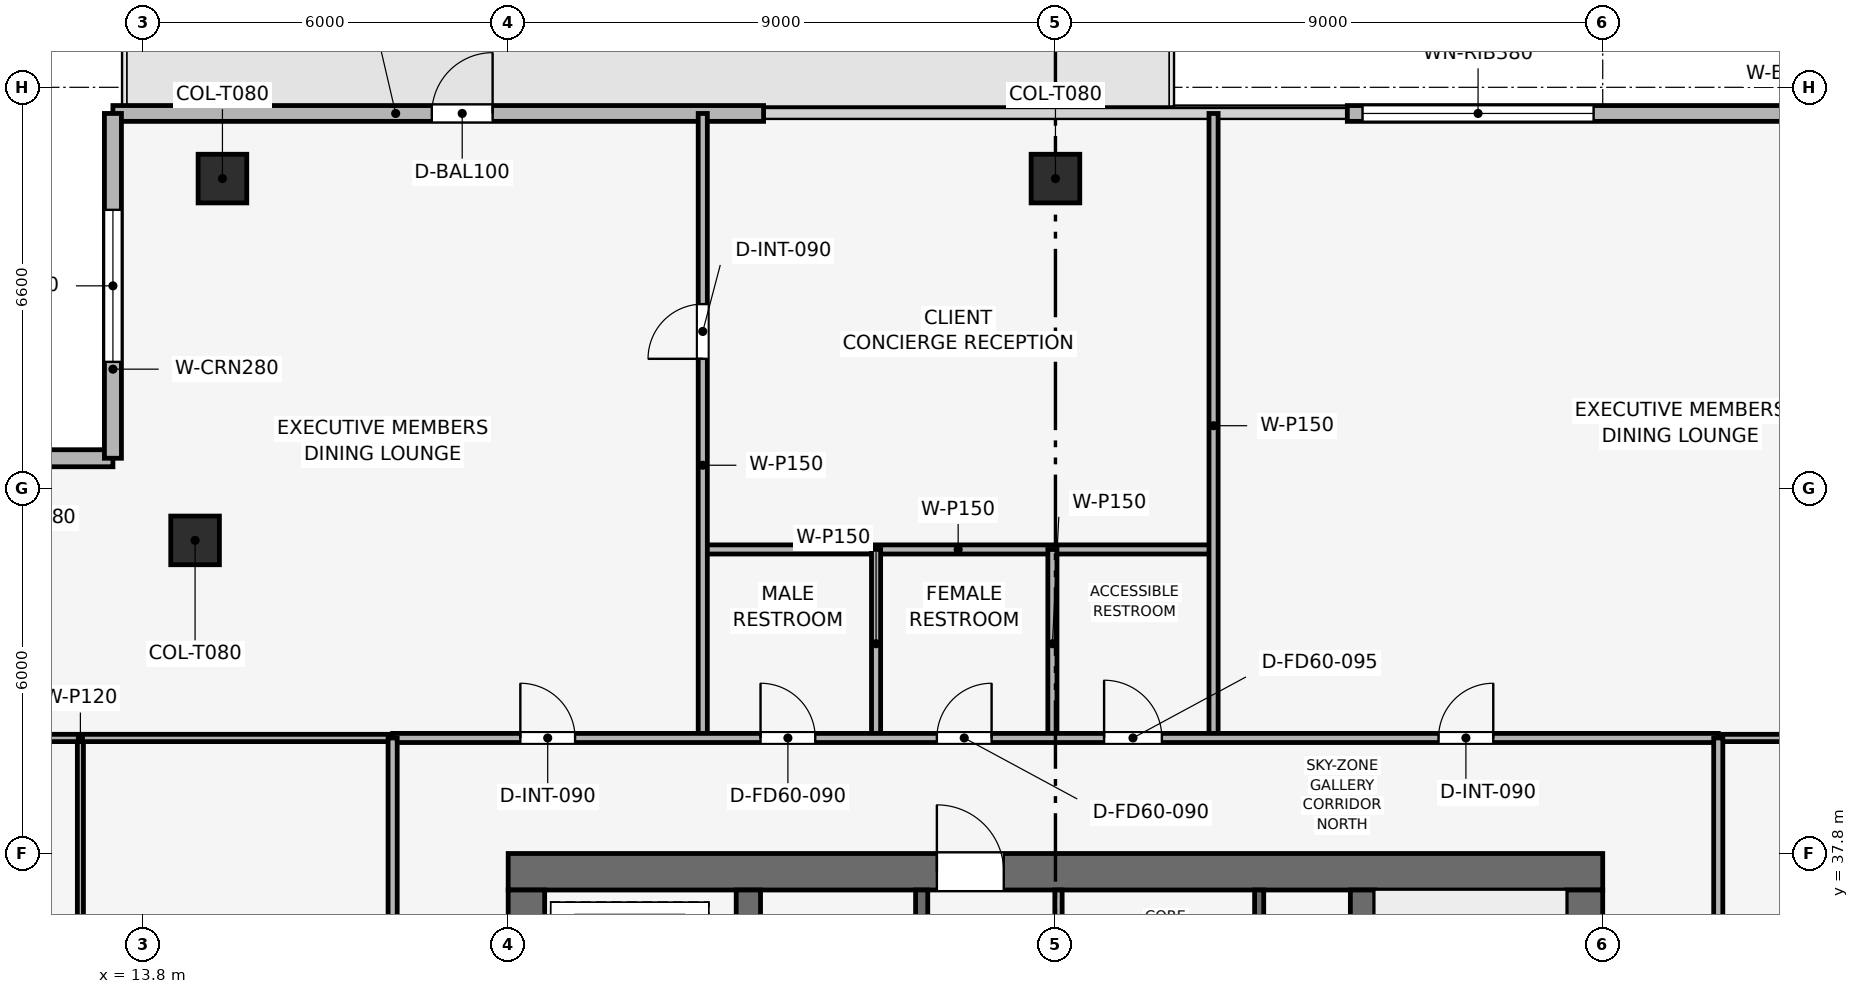
"""IFC4 building model, lengths in metres.
Left out: names, types, materials, properties, quantities, classifications, styles, units other than length and angle.
Written with IfcOpenShell. Run it as: python <this file> out.ifc"""

import sys

from ifc_helpers import new_model, si_unit, direction, frame, frame_2d, origin, origin_2d, place, context, subcontext, project, spatial, rectangle, extrude, element, fill, save


model = new_model("IFC4")
c1 = context("Model", 3, precision=1e-05, world=origin(), true_north=direction((0.0, 1.0)))
c2 = subcontext(c1, "Body", "Model", "MODEL_VIEW")
j1 = project(units=[si_unit("LENGTHUNIT", "METRE"), si_unit("PLANEANGLEUNIT", "RADIAN")], contexts=[c1])
p1 = place(None, origin())
s1 = spatial("IfcSite", under=j1, at=p1, CompositionType="ELEMENT")
p2 = place(p1, origin())
s2 = spatial("IfcBuilding", under=s1, at=p2, CompositionType="ELEMENT")
p3 = place(p2, frame((0.0, 0.0, 351.75)))
s3 = spatial("IfcBuildingStorey", under=s2, at=p3, CompositionType="ELEMENT", Elevation=351.75)
p4 = place(p3, frame((19.8, 37.5, 0.0), z_axis=(0.0, 0.0, 1.0), x_axis=(1.0, 0.0, 0.0)))
e1 = element("IfcWall", 1, at=p4, inside=s3, PredefinedType="SHEAR", context=c2, shape_type="SweptSolid", body=[
    extrude(rectangle(XDim=18.0, YDim=0.6, at=frame_2d((9.0, 0.0))), origin(), (0.0, 0.0, 1.0), 3.75),
])
p5 = place(p4, frame((7.05, 0.0, 0.0)))
e2 = element("IfcOpeningElement", 2, at=p5, cuts=e1, PredefinedType="OPENING", context=c2, shape_type="SweptSolid", body=[
    extrude(rectangle(XDim=1.1, YDim=2.15, at=frame_2d((0.55, 1.075))), frame((0.0, 0.31, 0.0), z_axis=(0.0, -1.0, 0.0), x_axis=(1.0, 0.0, 0.0)), (0.0, 0.0, 1.0), 0.62),
])
p6 = place(p3, frame((20.1, 20.4, 0.0), z_axis=(0.0, 0.0, 1.0), x_axis=(0.0, 1.0, 0.0)))
e3 = element("IfcWall", 3, at=p6, inside=s3, PredefinedType="SHEAR", context=c2, shape_type="SweptSolid", body=[
    extrude(rectangle(XDim=16.8, YDim=0.6, at=frame_2d((8.4, 0.0))), origin(), (0.0, 0.0, 1.0), 3.75),
])
p7 = place(p6, frame((10.4, 0.0, 0.0)))
e4 = element("IfcOpeningElement", 4, at=p7, cuts=e3, PredefinedType="OPENING", context=c2, shape_type="SweptSolid", body=[
    extrude(rectangle(XDim=1.1, YDim=2.15, at=frame_2d((0.55, 1.075))), frame((0.0, 0.31, 0.0), z_axis=(0.0, -1.0, 0.0), x_axis=(1.0, 0.0, 0.0)), (0.0, 0.0, 1.0), 0.62),
])
p8 = place(p3, frame((37.5, 20.4, 0.0), z_axis=(0.0, 0.0, 1.0), x_axis=(0.0, 1.0, 0.0)))
e5 = element("IfcWall", 5, at=p8, inside=s3, PredefinedType="SHEAR", context=c2, shape_type="SweptSolid", body=[
    extrude(rectangle(XDim=16.8, YDim=0.6, at=frame_2d((8.4, 0.0))), origin(), (0.0, 0.0, 1.0), 3.75),
])
p9 = place(p8, frame((4.9, 0.0, 0.0)))
e6 = element("IfcOpeningElement", 6, at=p9, cuts=e5, PredefinedType="OPENING", context=c2, shape_type="SweptSolid", body=[
    extrude(rectangle(XDim=1.1, YDim=2.15, at=frame_2d((0.55, 1.075))), frame((0.0, 0.31, 0.0), z_axis=(0.0, -1.0, 0.0), x_axis=(1.0, 0.0, 0.0)), (0.0, 0.0, 1.0), 0.62),
])
for number, where, z_axis, x_axis in (
    (7, (23.75, 20.4, 0.0), (0.0, 0.0, 1.0), (0.0, 1.0, 0.0)),
    (8, (33.85, 20.4, 0.0), (0.0, 0.0, 1.0), (0.0, 1.0, 0.0)),
):
    element("IfcWall", number, at=place(p3, frame(where, z_axis=z_axis, x_axis=x_axis)), inside=s3, PredefinedType="SHEAR", context=c2, shape_type="SweptSolid", body=[
        extrude(rectangle(XDim=16.8, YDim=0.4, at=frame_2d((8.4, 0.0))), origin(), (0.0, 0.0, 1.0), 3.75),
    ])
p10 = place(p3, frame((28.8, 48.899, 0.003), z_axis=(0.0, -0.233305947424, 0.972403380751), x_axis=(1.0, 0.0, 0.0)))
e9 = element("IfcColumn", 9, at=p10, inside=s3, PredefinedType="COLUMN", context=c2, shape_type="SweptSolid", body=[
    extrude(rectangle(XDim=0.8, YDim=0.8, at=origin_2d()), origin(), (0.0, 0.0, 1.0), 3.583),
])
p11 = place(p3, frame((15.101, 48.899, 0.003), z_axis=(0.178472331722, -0.229560204289, 0.956791377164), x_axis=(0.789476355048, 0.613780974632, 0.0)))
e10 = element("IfcColumn", 10, at=p11, inside=s3, PredefinedType="COLUMN", context=c2, shape_type="SweptSolid", body=[
    extrude(rectangle(XDim=0.8, YDim=0.8, at=origin_2d()), origin(), (0.0, 0.0, 1.0), 3.641),
])
p12 = place(p3, frame((14.651, 42.949, 0.003), z_axis=(0.180427651354, -0.180359897824, 0.966910631798), x_axis=(0.706973978714, 0.707239558722, 0.0)))
e11 = element("IfcColumn", 11, at=p12, inside=s3, PredefinedType="COLUMN", context=c2, shape_type="SweptSolid", body=[
    extrude(rectangle(XDim=0.8, YDim=0.8, at=origin_2d()), origin(), (0.0, 0.0, 1.0), 3.603),
])
p13 = place(p3, frame((13.3, 49.97, 0.0), z_axis=(0.0, 0.0, 1.0), x_axis=(1.0, 0.0, 0.0)))
e12 = element("IfcWall", 12, at=p13, inside=s3, PredefinedType="SOLIDWALL", context=c2, shape_type="SweptSolid", body=[
    extrude(rectangle(XDim=10.7, YDim=0.26, at=frame_2d((5.35, 0.0))), origin(), (0.0, 0.0, 1.0), 3.49),
])
p14 = place(p13, frame((5.244, 0.0, 0.0)))
e13 = element("IfcOpeningElement", 13, at=p14, cuts=e12, PredefinedType="OPENING", context=c2, shape_type="SweptSolid", body=[
    extrude(rectangle(XDim=1.0, YDim=2.2, at=frame_2d((0.5, 1.1))), frame((0.0, 0.14, 0.0), z_axis=(0.0, -1.0, 0.0), x_axis=(1.0, 0.0, 0.0)), (0.0, 0.0, 1.0), 0.28),
])
p15 = place(p3, frame((33.6, 49.97, 0.0), z_axis=(0.0, 0.0, 1.0), x_axis=(1.0, 0.0, 0.0)))
e14 = element("IfcWall", 14, at=p15, inside=s3, PredefinedType="SOLIDWALL", context=c2, shape_type="SweptSolid", body=[
    extrude(rectangle(XDim=10.7, YDim=0.26, at=frame_2d((5.35, 0.0))), origin(), (0.0, 0.0, 1.0), 3.49),
])
p16 = place(p15, frame((0.25, 0.0, 0.9)))
e15 = element("IfcOpeningElement", 15, at=p16, cuts=e14, PredefinedType="OPENING", context=c2, shape_type="SweptSolid", body=[
    extrude(rectangle(XDim=3.8, YDim=1.9, at=frame_2d((1.9, 0.95))), frame((0.0, 0.14, 0.0), z_axis=(0.0, -1.0, 0.0), x_axis=(1.0, 0.0, 0.0)), (0.0, 0.0, 1.0), 0.28),
])
p17 = place(p3, frame((7.63, 44.3, 0.0), z_axis=(0.0, 0.0, 1.0), x_axis=(1.0, 0.0, 0.0)))
e16 = element("IfcWall", 16, at=p17, inside=s3, PredefinedType="SOLIDWALL", context=c2, shape_type="SweptSolid", body=[
    extrude(rectangle(XDim=5.67, YDim=0.28, at=frame_2d((2.835, 0.0))), origin(), (0.0, 0.0, 1.0), 3.49),
])
p18 = place(p17, frame((1.585, 0.0, 0.9)))
e17 = element("IfcOpeningElement", 17, at=p18, cuts=e16, PredefinedType="OPENING", context=c2, shape_type="SweptSolid", body=[
    extrude(rectangle(XDim=2.5, YDim=1.9, at=frame_2d((1.25, 0.95))), frame((0.0, 0.15, 0.0), z_axis=(0.0, -1.0, 0.0), x_axis=(1.0, 0.0, 0.0)), (0.0, 0.0, 1.0), 0.3),
])
p19 = place(p3, frame((13.3, 44.3, 0.0), z_axis=(0.0, 0.0, 1.0), x_axis=(0.0, 1.0, 0.0)))
e18 = element("IfcWall", 18, at=p19, inside=s3, PredefinedType="SOLIDWALL", context=c2, shape_type="SweptSolid", body=[
    extrude(rectangle(XDim=5.67, YDim=0.28, at=frame_2d((2.835, 0.0))), origin(), (0.0, 0.0, 1.0), 3.49),
])
p20 = place(p19, frame((1.585, 0.0, 0.9)))
e19 = element("IfcOpeningElement", 19, at=p20, cuts=e18, PredefinedType="OPENING", context=c2, shape_type="SweptSolid", body=[
    extrude(rectangle(XDim=2.5, YDim=1.9, at=frame_2d((1.25, 0.95))), frame((0.0, 0.15, 0.0), z_axis=(0.0, -1.0, 0.0), x_axis=(1.0, 0.0, 0.0)), (0.0, 0.0, 1.0), 0.3),
])
p21 = place(p3, frame((32.15, 34.0, 0.0), z_axis=(0.0, 0.0, 1.0), x_axis=(0.0, 1.0, 0.0)))
e20 = element("IfcWall", 20, at=p21, inside=s3, PredefinedType="SHEAR", context=c2, shape_type="SweptSolid", body=[
    extrude(rectangle(XDim=3.2, YDim=0.15, at=frame_2d((1.6, 0.0))), origin(), (0.0, 0.0, 1.0), 3.49),
])
p22 = place(p3, frame((26.6, 34.0, 0.0), z_axis=(0.0, 0.0, 1.0), x_axis=(0.0, 1.0, 0.0)))
e21 = element("IfcWall", 21, at=p22, inside=s3, PredefinedType="SHEAR", context=c2, shape_type="SweptSolid", body=[
    extrude(rectangle(XDim=3.2, YDim=0.2, at=frame_2d((1.6, 0.0))), origin(), (0.0, 0.0, 1.0), 3.49),
])
p23 = place(p22, frame((0.75, 0.0, 0.0)))
e22 = element("IfcOpeningElement", 22, at=p23, cuts=e21, PredefinedType="OPENING", context=c2, shape_type="SweptSolid", body=[
    extrude(rectangle(XDim=1.1, YDim=2.15, at=frame_2d((0.55, 1.075))), frame((0.0, 0.11, 0.0), z_axis=(0.0, -1.0, 0.0), x_axis=(1.0, 0.0, 0.0)), (0.0, 0.0, 1.0), 0.22),
])
p24 = place(p3, frame((28.85, 33.925, 0.0), z_axis=(0.0, 0.0, 1.0), x_axis=(0.0, 1.0, 0.0)))
e23 = element("IfcWall", 23, at=p24, inside=s3, PredefinedType="PARTITIONING", context=c2, shape_type="SweptSolid", body=[
    extrude(rectangle(XDim=3.275, YDim=0.12, at=frame_2d((1.637, 0.0))), origin(), (0.0, 0.0, 1.0), 3.49),
])
p25 = place(p24, frame((0.25, 0.0, 0.0)))
e24 = element("IfcOpeningElement", 24, at=p25, cuts=e23, PredefinedType="OPENING", context=c2, shape_type="SweptSolid", body=[
    extrude(rectangle(XDim=0.85, YDim=2.1, at=frame_2d((0.425, 1.05))), frame((0.0, 0.07, 0.0), z_axis=(0.0, -1.0, 0.0), x_axis=(1.0, 0.0, 0.0)), (0.0, 0.0, 1.0), 0.14),
])
p26 = place(p24, frame((1.795, 0.0, 0.0)))
e25 = element("IfcOpeningElement", 25, at=p26, cuts=e23, PredefinedType="OPENING", context=c2, shape_type="SweptSolid", body=[
    extrude(rectangle(XDim=0.85, YDim=2.1, at=frame_2d((0.425, 1.05))), frame((0.0, 0.07, 0.0), z_axis=(0.0, -1.0, 0.0), x_axis=(1.0, 0.0, 0.0)), (0.0, 0.0, 1.0), 0.14),
])
p27 = place(p3, frame((23.0, 42.8, 0.0), z_axis=(0.0, 0.0, 1.0), x_axis=(1.0, 0.0, 0.0)))
e26 = element("IfcWall", 26, at=p27, inside=s3, PredefinedType="PARTITIONING", context=c2, shape_type="SweptSolid", body=[
    extrude(rectangle(XDim=8.4, YDim=0.15, at=frame_2d((4.2, 0.0))), origin(), (0.0, 0.0, 1.0), 3.075),
])
p28 = place(p3, frame((23.0, 39.7, 0.0), z_axis=(0.0, 0.0, 1.0), x_axis=(0.0, 1.0, 0.0)))
e27 = element("IfcWall", 27, at=p28, inside=s3, PredefinedType="PARTITIONING", context=c2, shape_type="SweptSolid", body=[
    extrude(rectangle(XDim=10.27, YDim=0.15, at=frame_2d((5.135, 0.0))), origin(), (0.0, 0.0, 1.0), 3.115),
])
p29 = place(p28, frame((6.235, 0.0, 0.0)))
e28 = element("IfcOpeningElement", 28, at=p29, cuts=e27, PredefinedType="OPENING", context=c2, shape_type="SweptSolid", body=[
    extrude(rectangle(XDim=0.9, YDim=2.1, at=frame_2d((0.45, 1.05))), frame((0.0, 0.085, 0.0), z_axis=(0.0, -1.0, 0.0), x_axis=(1.0, 0.0, 0.0)), (0.0, 0.0, 1.0), 0.17),
])
p30 = place(p3, frame((31.4, 39.7, 0.0), z_axis=(0.0, 0.0, 1.0), x_axis=(0.0, 1.0, 0.0)))
e29 = element("IfcWall", 29, at=p30, inside=s3, PredefinedType="PARTITIONING", context=c2, shape_type="SweptSolid", body=[
    extrude(rectangle(XDim=10.27, YDim=0.15, at=frame_2d((5.135, 0.0))), origin(), (0.0, 0.0, 1.0), 3.115),
])
p31 = place(p3, frame((25.85, 39.7, 0.0), z_axis=(0.0, 0.0, 1.0), x_axis=(0.0, 1.0, 0.0)))
e30 = element("IfcWall", 30, at=p31, inside=s3, PredefinedType="PARTITIONING", context=c2, shape_type="SweptSolid", body=[
    extrude(rectangle(XDim=3.1, YDim=0.15, at=frame_2d((1.55, 0.0))), origin(), (0.0, 0.0, 1.0), 3.115),
])
p32 = place(p3, frame((28.75, 39.7, 0.0), z_axis=(0.0, 0.0, 1.0), x_axis=(0.0, 1.0, 0.0)))
e31 = element("IfcWall", 31, at=p32, inside=s3, PredefinedType="PARTITIONING", context=c2, shape_type="SweptSolid", body=[
    extrude(rectangle(XDim=3.1, YDim=0.15, at=frame_2d((1.55, 0.0))), origin(), (0.0, 0.0, 1.0), 3.075),
])
p33 = place(p3, frame((12.765, 22.358, 0.0), z_axis=(0.0, 0.0, 1.0), x_axis=(0.0, 1.0, 0.0)))
e32 = element("IfcWall", 32, at=p33, inside=s3, PredefinedType="MOVABLE", context=c2, shape_type="SweptSolid", body=[
    extrude(rectangle(XDim=17.342, YDim=0.1, at=frame_2d((8.671, 0.0))), origin(), (0.0, 0.0, 1.0), 3.075),
])
p34 = place(p33, frame((12.9, 0.0, 0.0)))
e33 = element("IfcOpeningElement", 33, at=p34, cuts=e32, PredefinedType="OPENING", context=c2, shape_type="SweptSolid", body=[
    extrude(rectangle(XDim=0.9, YDim=2.1, at=frame_2d((0.45, 1.05))), frame((0.0, 0.06, 0.0), z_axis=(0.0, -1.0, 0.0), x_axis=(1.0, 0.0, 0.0)), (0.0, 0.0, 1.0), 0.12),
])
for number, where, z_axis, x_axis in (
    (34, (7.63, 39.7, 0.0), (0.0, 0.0, 1.0), (1.0, 0.0, 0.0)),
    (35, (39.7, 39.7, 0.0), (0.0, 0.0, 1.0), (1.0, 0.0, 0.0)),
):
    element("IfcWall", number, at=place(p3, frame(where, z_axis=z_axis, x_axis=x_axis)), inside=s3, PredefinedType="PARTITIONING", context=c2, shape_type="SweptSolid", body=[
        extrude(rectangle(XDim=10.27, YDim=0.12, at=frame_2d((5.135, 0.0))), origin(), (0.0, 0.0, 1.0), 3.075),
    ])
p35 = place(p3, frame((17.9, 39.7, 0.0), z_axis=(0.0, 0.0, 1.0), x_axis=(1.0, 0.0, 0.0)))
e36 = element("IfcWall", 36, at=p35, inside=s3, PredefinedType="PARTITIONING", context=c2, shape_type="SweptSolid", body=[
    extrude(rectangle(XDim=21.8, YDim=0.15, at=frame_2d((10.9, 0.0))), origin(), (0.0, 0.0, 1.0), 3.075),
])
p36 = place(p35, frame((2.1, 0.0, 0.0)))
e37 = element("IfcOpeningElement", 37, at=p36, cuts=e36, PredefinedType="OPENING", context=c2, shape_type="SweptSolid", body=[
    extrude(rectangle(XDim=0.9, YDim=2.1, at=frame_2d((0.45, 1.05))), frame((0.0, 0.085, 0.0), z_axis=(0.0, -1.0, 0.0), x_axis=(1.0, 0.0, 0.0)), (0.0, 0.0, 1.0), 0.17),
])
p37 = place(p35, frame((6.05, 0.0, 0.0)))
e38 = element("IfcOpeningElement", 38, at=p37, cuts=e36, PredefinedType="OPENING", context=c2, shape_type="SweptSolid", body=[
    extrude(rectangle(XDim=0.9, YDim=2.1, at=frame_2d((0.45, 1.05))), frame((0.0, 0.085, 0.0), z_axis=(0.0, -1.0, 0.0), x_axis=(1.0, 0.0, 0.0)), (0.0, 0.0, 1.0), 0.17),
])
p38 = place(p35, frame((8.95, 0.0, 0.0)))
e39 = element("IfcOpeningElement", 39, at=p38, cuts=e36, PredefinedType="OPENING", context=c2, shape_type="SweptSolid", body=[
    extrude(rectangle(XDim=0.9, YDim=2.1, at=frame_2d((0.45, 1.05))), frame((0.0, 0.085, 0.0), z_axis=(0.0, -1.0, 0.0), x_axis=(1.0, 0.0, 0.0)), (0.0, 0.0, 1.0), 0.17),
])
p39 = place(p35, frame((11.7, 0.0, 0.0)))
e40 = element("IfcOpeningElement", 40, at=p39, cuts=e36, PredefinedType="OPENING", context=c2, shape_type="SweptSolid", body=[
    extrude(rectangle(XDim=0.95, YDim=2.1, at=frame_2d((0.475, 1.05))), frame((0.0, 0.085, 0.0), z_axis=(0.0, -1.0, 0.0), x_axis=(1.0, 0.0, 0.0)), (0.0, 0.0, 1.0), 0.17),
])
p40 = place(p35, frame((17.2, 0.0, 0.0)))
e41 = element("IfcOpeningElement", 41, at=p40, cuts=e36, PredefinedType="OPENING", context=c2, shape_type="SweptSolid", body=[
    extrude(rectangle(XDim=0.9, YDim=2.1, at=frame_2d((0.45, 1.05))), frame((0.0, 0.085, 0.0), z_axis=(0.0, -1.0, 0.0), x_axis=(1.0, 0.0, 0.0)), (0.0, 0.0, 1.0), 0.17),
])
p41 = place(p3, frame((17.9, 13.3, 0.0), z_axis=(0.0, 0.0, 1.0), x_axis=(0.0, 1.0, 0.0)))
e42 = element("IfcWall", 42, at=p41, inside=s3, PredefinedType="PARTITIONING", context=c2, shape_type="SweptSolid", body=[
    extrude(rectangle(XDim=26.4, YDim=0.15, at=frame_2d((13.2, 0.0))), origin(), (0.0, 0.0, 1.0), 3.075),
])
p42 = place(p41, frame((4.079, 0.0, 0.0)))
e43 = element("IfcOpeningElement", 43, at=p42, cuts=e42, PredefinedType="OPENING", context=c2, shape_type="SweptSolid", body=[
    extrude(rectangle(XDim=0.9, YDim=2.1, at=frame_2d((0.45, 1.05))), frame((0.0, 0.085, 0.0), z_axis=(0.0, -1.0, 0.0), x_axis=(1.0, 0.0, 0.0)), (0.0, 0.0, 1.0), 0.17),
])
p43 = place(p41, frame((17.279, 0.0, 0.0)))
e44 = element("IfcOpeningElement", 44, at=p43, cuts=e42, PredefinedType="OPENING", context=c2, shape_type="SweptSolid", body=[
    extrude(rectangle(XDim=0.9, YDim=2.1, at=frame_2d((0.45, 1.05))), frame((0.0, 0.085, 0.0), z_axis=(0.0, -1.0, 0.0), x_axis=(1.0, 0.0, 0.0)), (0.0, 0.0, 1.0), 0.17),
])
p44 = place(p3, frame((39.7, 24.4, 0.0), z_axis=(0.0, 0.0, 1.0), x_axis=(0.0, 1.0, 0.0)))
e45 = element("IfcWall", 45, at=p44, inside=s3, PredefinedType="PARTITIONING", context=c2, shape_type="SweptSolid", body=[
    extrude(rectangle(XDim=15.3, YDim=0.15, at=frame_2d((7.65, 0.0))), origin(), (0.0, 0.0, 1.0), 3.075),
])
p45 = place(p44, frame((7.2, 0.0, 0.0)))
e46 = element("IfcOpeningElement", 46, at=p45, cuts=e45, PredefinedType="OPENING", context=c2, shape_type="SweptSolid", body=[
    extrude(rectangle(XDim=0.9, YDim=2.1, at=frame_2d((0.45, 1.05))), frame((0.0, 0.085, 0.0), z_axis=(0.0, -1.0, 0.0), x_axis=(1.0, 0.0, 0.0)), (0.0, 0.0, 1.0), 0.17),
])
p46 = place(p14, origin())
e47 = element("IfcDoor", 47, at=p46, inside=s3, OperationType="SINGLE_SWING_RIGHT", PredefinedType="DOOR", context=c2, shape_type="SweptSolid", body=[
    extrude(rectangle(XDim=1.0, YDim=2.2, at=frame_2d((0.5, 1.1))), frame((0.0, 0.025, 0.0), z_axis=(0.0, -1.0, 0.0), x_axis=(1.0, 0.0, 0.0)), (0.0, 0.0, 1.0), 0.05),
])
fill(e13, e47)
p47 = place(p16, origin())
e48 = element("IfcWindow", 48, at=p47, inside=s3, PartitioningType="SINGLE_PANEL", PredefinedType="WINDOW", context=c2, shape_type="SweptSolid", body=[
    extrude(rectangle(XDim=3.8, YDim=1.9, at=frame_2d((1.9, 0.95))), frame((0.0, 0.03, 0.0), z_axis=(0.0, -1.0, 0.0), x_axis=(1.0, 0.0, 0.0)), (0.0, 0.0, 1.0), 0.06),
])
fill(e15, e48)
p48 = place(p20, origin())
e49 = element("IfcWindow", 49, at=p48, inside=s3, PartitioningType="SINGLE_PANEL", PredefinedType="WINDOW", context=c2, shape_type="SweptSolid", body=[
    extrude(rectangle(XDim=2.5, YDim=1.9, at=frame_2d((1.25, 0.95))), frame((0.0, 0.03, 0.0), z_axis=(0.0, -1.0, 0.0), x_axis=(1.0, 0.0, 0.0)), (0.0, 0.0, 1.0), 0.06),
])
fill(e19, e49)
p49 = place(p29, origin())
e50 = element("IfcDoor", 50, at=p49, inside=s3, OperationType="SINGLE_SWING_LEFT", PredefinedType="DOOR", context=c2, shape_type="SweptSolid", body=[
    extrude(rectangle(XDim=0.9, YDim=2.1, at=frame_2d((0.45, 1.05))), frame((0.0, 0.025, 0.0), z_axis=(0.0, -1.0, 0.0), x_axis=(1.0, 0.0, 0.0)), (0.0, 0.0, 1.0), 0.05),
])
fill(e28, e50)
p50 = place(p36, origin())
e51 = element("IfcDoor", 51, at=p50, inside=s3, OperationType="SINGLE_SWING_LEFT", PredefinedType="DOOR", context=c2, shape_type="SweptSolid", body=[
    extrude(rectangle(XDim=0.9, YDim=2.1, at=frame_2d((0.45, 1.05))), frame((0.0, 0.025, 0.0), z_axis=(0.0, -1.0, 0.0), x_axis=(1.0, 0.0, 0.0)), (0.0, 0.0, 1.0), 0.05),
])
fill(e37, e51)
p51 = place(p37, origin())
e52 = element("IfcDoor", 52, at=p51, inside=s3, OperationType="SINGLE_SWING_LEFT", PredefinedType="DOOR", context=c2, shape_type="SweptSolid", body=[
    extrude(rectangle(XDim=0.9, YDim=2.1, at=frame_2d((0.45, 1.05))), frame((0.0, 0.025, 0.0), z_axis=(0.0, -1.0, 0.0), x_axis=(1.0, 0.0, 0.0)), (0.0, 0.0, 1.0), 0.05),
])
fill(e38, e52)
p52 = place(p38, origin())
e53 = element("IfcDoor", 53, at=p52, inside=s3, OperationType="SINGLE_SWING_RIGHT", PredefinedType="DOOR", context=c2, shape_type="SweptSolid", body=[
    extrude(rectangle(XDim=0.9, YDim=2.1, at=frame_2d((0.45, 1.05))), frame((0.0, 0.025, 0.0), z_axis=(0.0, -1.0, 0.0), x_axis=(1.0, 0.0, 0.0)), (0.0, 0.0, 1.0), 0.05),
])
fill(e39, e53)
p53 = place(p39, origin())
e54 = element("IfcDoor", 54, at=p53, inside=s3, OperationType="SINGLE_SWING_LEFT", PredefinedType="DOOR", context=c2, shape_type="SweptSolid", body=[
    extrude(rectangle(XDim=0.95, YDim=2.1, at=frame_2d((0.475, 1.05))), frame((0.0, 0.025, 0.0), z_axis=(0.0, -1.0, 0.0), x_axis=(1.0, 0.0, 0.0)), (0.0, 0.0, 1.0), 0.05),
])
fill(e40, e54)
p54 = place(p40, origin())
e55 = element("IfcDoor", 55, at=p54, inside=s3, OperationType="SINGLE_SWING_RIGHT", PredefinedType="DOOR", context=c2, shape_type="SweptSolid", body=[
    extrude(rectangle(XDim=0.9, YDim=2.1, at=frame_2d((0.45, 1.05))), frame((0.0, 0.025, 0.0), z_axis=(0.0, -1.0, 0.0), x_axis=(1.0, 0.0, 0.0)), (0.0, 0.0, 1.0), 0.05),
])
fill(e41, e55)
p55 = place(p5, origin())
e56 = element("IfcDoor", 56, at=p55, inside=s3, OperationType="SINGLE_SWING_LEFT", PredefinedType="DOOR", context=c2, shape_type="SweptSolid", body=[
    extrude(rectangle(XDim=1.1, YDim=2.15, at=frame_2d((0.55, 1.075))), frame((0.0, 0.025, 0.0), z_axis=(0.0, -1.0, 0.0), x_axis=(1.0, 0.0, 0.0)), (0.0, 0.0, 1.0), 0.05),
])
fill(e2, e56)
save(model, sys.argv[1])
